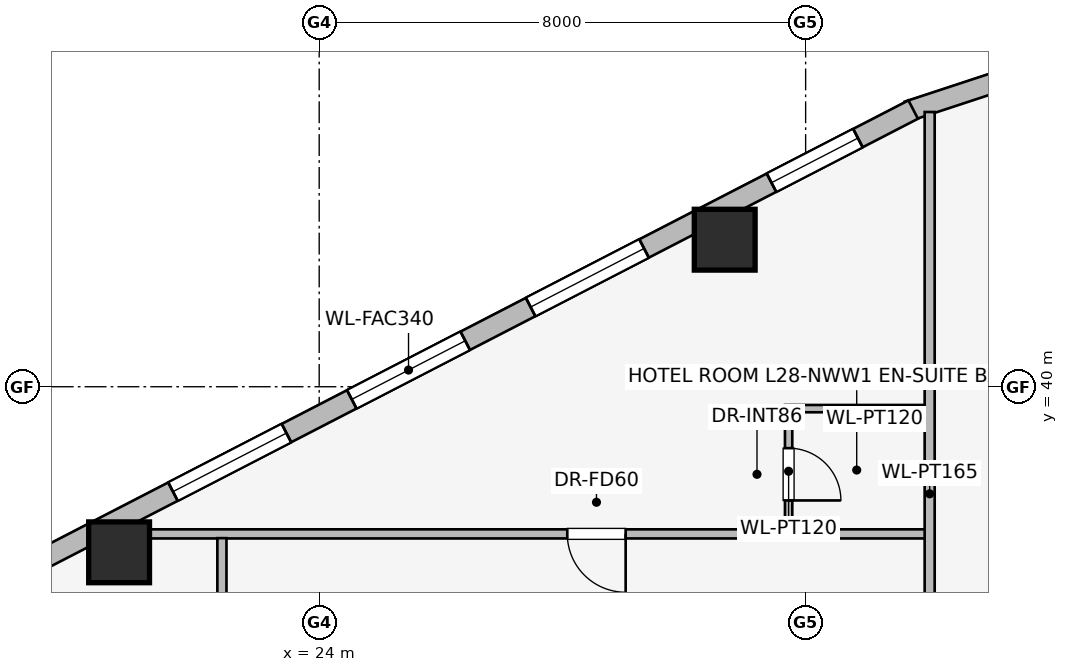
"""IFC4 building model, lengths in metres.
Left out: names, types, materials, properties, quantities, classifications, styles, units other than length and angle.
Written with IfcOpenShell. Run it as: python <this file> out.ifc"""

import sys

from ifc_helpers import new_model, si_unit, direction, frame, frame_2d, origin, origin_2d, place, context, subcontext, project, spatial, rectangle, extrude, element, fill, save


model = new_model("IFC4")
c1 = context("Model", 3, precision=1e-05, world=origin(), true_north=direction((0.0, 1.0)))
c2 = subcontext(c1, "Body", "Model", "MODEL_VIEW")
j1 = project(units=[si_unit("LENGTHUNIT", "METRE"), si_unit("PLANEANGLEUNIT", "RADIAN")], contexts=[c1])
p1 = place(None, origin())
s1 = spatial("IfcSite", under=j1, at=p1, CompositionType="ELEMENT")
p2 = place(p1, origin())
s2 = spatial("IfcBuilding", under=s1, at=p2, CompositionType="ELEMENT")
p3 = place(p2, frame((0.0, 0.0, 108.45)))
s3 = spatial("IfcBuildingStorey", under=s2, at=p3, CompositionType="ELEMENT", Elevation=108.45)
for number, where, z_axis, x_axis in (
    (1, (30.669, 42.418, 0.0), (0.0, 0.0, 1.0), (1.0, 0.0, 0.0)),
    (2, (20.709, 37.277, 0.0), (0.0, 0.0, 1.0), (1.0, 0.0, 0.0)),
):
    element("IfcColumn", number, at=place(p3, frame(where, z_axis=z_axis, x_axis=x_axis)), inside=s3, PredefinedType="COLUMN", context=c2, shape_type="SweptSolid", body=[
        extrude(rectangle(XDim=1.0, YDim=1.0, at=origin_2d()), origin(), (0.0, 0.0, 1.0), 3.45),
    ])
p4 = place(p3, frame((33.681, 44.532, 0.0), z_axis=(0.0, 0.0, 1.0), x_axis=(0.949937416267, 0.312440242569, 0.0)))
e3 = element("IfcWall", 3, at=p4, inside=s3, PredefinedType="STANDARD", context=c2, shape_type="SweptSolid", body=[
    extrude(rectangle(XDim=1.722, YDim=0.33, at=frame_2d((0.861, 0.0))), origin(), (0.0, 0.0, 1.0), 3.16),
])
p5 = place(p3, frame((17.169, 35.99, 0.0), z_axis=(0.0, 0.0, 1.0), x_axis=(0.888613612362, 0.458656568606, 0.0)))
e4 = element("IfcWall", 4, at=p5, inside=s3, PredefinedType="STANDARD", context=c2, shape_type="SweptSolid", body=[
    extrude(rectangle(XDim=18.681, YDim=0.34, at=frame_2d((9.34, 0.0))), origin(), (0.0, 0.0, 1.0), 3.16),
])
p6 = place(p5, frame((1.023, 0.0, 0.75)))
e5 = element("IfcOpeningElement", 5, at=p6, cuts=e4, PredefinedType="OPENING", context=c2, shape_type="SweptSolid", body=[
    extrude(rectangle(XDim=1.6, YDim=1.55, at=frame_2d((0.8, 0.775))), frame((0.0, 0.18, 0.0), z_axis=(0.0, -1.0, 0.0), x_axis=(1.0, 0.0, 0.0)), (0.0, 0.0, 1.0), 0.36),
])
p7 = place(p5, frame((4.981, 0.0, 0.75)))
e6 = element("IfcOpeningElement", 6, at=p7, cuts=e4, PredefinedType="OPENING", context=c2, shape_type="SweptSolid", body=[
    extrude(rectangle(XDim=2.1, YDim=1.5, at=frame_2d((1.05, 0.75))), frame((0.0, 0.18, 0.0), z_axis=(0.0, -1.0, 0.0), x_axis=(1.0, 0.0, 0.0)), (0.0, 0.0, 1.0), 0.36),
])
p8 = place(p5, frame((8.29, 0.0, 0.75)))
e7 = element("IfcOpeningElement", 7, at=p8, cuts=e4, PredefinedType="OPENING", context=c2, shape_type="SweptSolid", body=[
    extrude(rectangle(XDim=2.1, YDim=1.5, at=frame_2d((1.05, 0.75))), frame((0.0, 0.18, 0.0), z_axis=(0.0, -1.0, 0.0), x_axis=(1.0, 0.0, 0.0)), (0.0, 0.0, 1.0), 0.36),
])
p9 = place(p5, frame((11.6, 0.0, 0.75)))
e8 = element("IfcOpeningElement", 8, at=p9, cuts=e4, PredefinedType="OPENING", context=c2, shape_type="SweptSolid", body=[
    extrude(rectangle(XDim=2.1, YDim=1.5, at=frame_2d((1.05, 0.75))), frame((0.0, 0.18, 0.0), z_axis=(0.0, -1.0, 0.0), x_axis=(1.0, 0.0, 0.0)), (0.0, 0.0, 1.0), 0.36),
])
p10 = place(p5, frame((16.058, 0.0, 0.75)))
e9 = element("IfcOpeningElement", 9, at=p10, cuts=e4, PredefinedType="OPENING", context=c2, shape_type="SweptSolid", body=[
    extrude(rectangle(XDim=1.6, YDim=1.55, at=frame_2d((0.8, 0.775))), frame((0.0, 0.18, 0.0), z_axis=(0.0, -1.0, 0.0), x_axis=(1.0, 0.0, 0.0)), (0.0, 0.0, 1.0), 0.36),
])
p11 = place(p3, frame((34.0, 39.64, 0.0), z_axis=(0.0, 0.0, 1.0), x_axis=(-1.0, 0.0, 0.0)))
e10 = element("IfcWall", 10, at=p11, inside=s3, PredefinedType="PARTITIONING", context=c2, shape_type="SweptSolid", body=[
    extrude(rectangle(XDim=2.34, YDim=0.12, at=frame_2d((1.17, 0.0))), origin(), (0.0, 0.0, 1.0), 3.16),
])
p12 = place(p3, frame((31.72, 39.64, 0.0), z_axis=(0.0, 0.0, 1.0), x_axis=(0.0, -1.0, 0.0)))
e11 = element("IfcWall", 11, at=p12, inside=s3, PredefinedType="PARTITIONING", context=c2, shape_type="SweptSolid", body=[
    extrude(rectangle(XDim=2.06, YDim=0.12, at=frame_2d((1.03, 0.0))), origin(), (0.0, 0.0, 1.0), 3.16),
])
p13 = place(p12, frame((0.65, 0.0, 0.0)))
e12 = element("IfcOpeningElement", 12, at=p13, cuts=e11, PredefinedType="OPENING", context=c2, shape_type="SweptSolid", body=[
    extrude(rectangle(XDim=0.86, YDim=2.0, at=frame_2d((0.43, 1.0))), frame((0.0, 0.07, 0.0), z_axis=(0.0, -1.0, 0.0), x_axis=(1.0, 0.0, 0.0)), (0.0, 0.0, 1.0), 0.14),
])
p14 = place(p3, frame((34.0, 37.58, 0.0), z_axis=(0.0, 0.0, 1.0), x_axis=(-1.0, 0.0, 0.0)))
e13 = element("IfcWall", 13, at=p14, inside=s3, PredefinedType="PARTITIONING", context=c2, shape_type="SweptSolid", body=[
    extrude(rectangle(XDim=13.707, YDim=0.15, at=frame_2d((6.854, 0.0))), origin(), (0.0, 0.0, 1.0), 2.552),
])
p15 = place(p14, frame((4.96, 0.0, 0.0)))
e14 = element("IfcOpeningElement", 14, at=p15, cuts=e13, PredefinedType="OPENING", context=c2, shape_type="SweptSolid", body=[
    extrude(rectangle(XDim=0.96, YDim=2.0, at=frame_2d((0.48, 1.0))), frame((0.0, 0.085, 0.0), z_axis=(0.0, -1.0, 0.0), x_axis=(1.0, 0.0, 0.0)), (0.0, 0.0, 1.0), 0.17),
])
p16 = place(p3, frame((34.04, 31.96, 0.0), z_axis=(0.0, 0.0, 1.0), x_axis=(0.0, 1.0, 0.0)))
e15 = element("IfcWall", 15, at=p16, inside=s3, PredefinedType="PARTITIONING", context=c2, shape_type="SweptSolid", body=[
    extrude(rectangle(XDim=12.558, YDim=0.165, at=frame_2d((6.279, 0.0))), origin(), (0.0, 0.0, 1.0), 3.16),
])
p17 = place(p3, frame((22.4, 36.08, 0.0), z_axis=(0.0, 0.0, 1.0), x_axis=(0.0, 1.0, 0.0)))
e16 = element("IfcWall", 16, at=p17, inside=s3, PredefinedType="PARTITIONING", context=c2, shape_type="SweptSolid", body=[
    extrude(rectangle(XDim=1.43, YDim=0.15, at=frame_2d((0.715, 0.0))), origin(), (0.0, 0.0, 1.0), 3.16),
])
p18 = place(p7, origin())
e17 = element("IfcWindow", 17, at=p18, inside=s3, PartitioningType="SINGLE_PANEL", PredefinedType="WINDOW", context=c2, shape_type="SweptSolid", body=[
    extrude(rectangle(XDim=2.1, YDim=1.5, at=frame_2d((1.05, 0.75))), frame((0.0, 0.03, 0.0), z_axis=(0.0, -1.0, 0.0), x_axis=(1.0, 0.0, 0.0)), (0.0, 0.0, 1.0), 0.06),
])
fill(e6, e17)
p19 = place(p8, origin())
e18 = element("IfcWindow", 18, at=p19, inside=s3, PartitioningType="SINGLE_PANEL", PredefinedType="WINDOW", context=c2, shape_type="SweptSolid", body=[
    extrude(rectangle(XDim=2.1, YDim=1.5, at=frame_2d((1.05, 0.75))), frame((0.0, 0.03, 0.0), z_axis=(0.0, -1.0, 0.0), x_axis=(1.0, 0.0, 0.0)), (0.0, 0.0, 1.0), 0.06),
])
fill(e7, e18)
p20 = place(p9, origin())
e19 = element("IfcWindow", 19, at=p20, inside=s3, PartitioningType="SINGLE_PANEL", PredefinedType="WINDOW", context=c2, shape_type="SweptSolid", body=[
    extrude(rectangle(XDim=2.1, YDim=1.5, at=frame_2d((1.05, 0.75))), frame((0.0, 0.03, 0.0), z_axis=(0.0, -1.0, 0.0), x_axis=(1.0, 0.0, 0.0)), (0.0, 0.0, 1.0), 0.06),
])
fill(e8, e19)
p21 = place(p10, origin())
e20 = element("IfcWindow", 20, at=p21, inside=s3, PartitioningType="SINGLE_PANEL", PredefinedType="WINDOW", context=c2, shape_type="SweptSolid", body=[
    extrude(rectangle(XDim=1.6, YDim=1.55, at=frame_2d((0.8, 0.775))), frame((0.0, 0.03, 0.0), z_axis=(0.0, -1.0, 0.0), x_axis=(1.0, 0.0, 0.0)), (0.0, 0.0, 1.0), 0.06),
])
fill(e9, e20)
p22 = place(p13, origin())
e21 = element("IfcDoor", 21, at=p22, inside=s3, OperationType="SINGLE_SWING_RIGHT", PredefinedType="DOOR", context=c2, shape_type="SweptSolid", body=[
    extrude(rectangle(XDim=0.86, YDim=2.0, at=frame_2d((0.43, 1.0))), frame((0.0, 0.025, 0.0), z_axis=(0.0, -1.0, 0.0), x_axis=(1.0, 0.0, 0.0)), (0.0, 0.0, 1.0), 0.05),
])
fill(e12, e21)
p23 = place(p15, origin())
e22 = element("IfcDoor", 22, at=p23, inside=s3, OperationType="SINGLE_SWING_LEFT", PredefinedType="DOOR", context=c2, shape_type="SweptSolid", body=[
    extrude(rectangle(XDim=0.96, YDim=2.0, at=frame_2d((0.48, 1.0))), frame((0.0, 0.025, 0.0), z_axis=(0.0, -1.0, 0.0), x_axis=(1.0, 0.0, 0.0)), (0.0, 0.0, 1.0), 0.05),
])
fill(e14, e22)
save(model, sys.argv[1])
